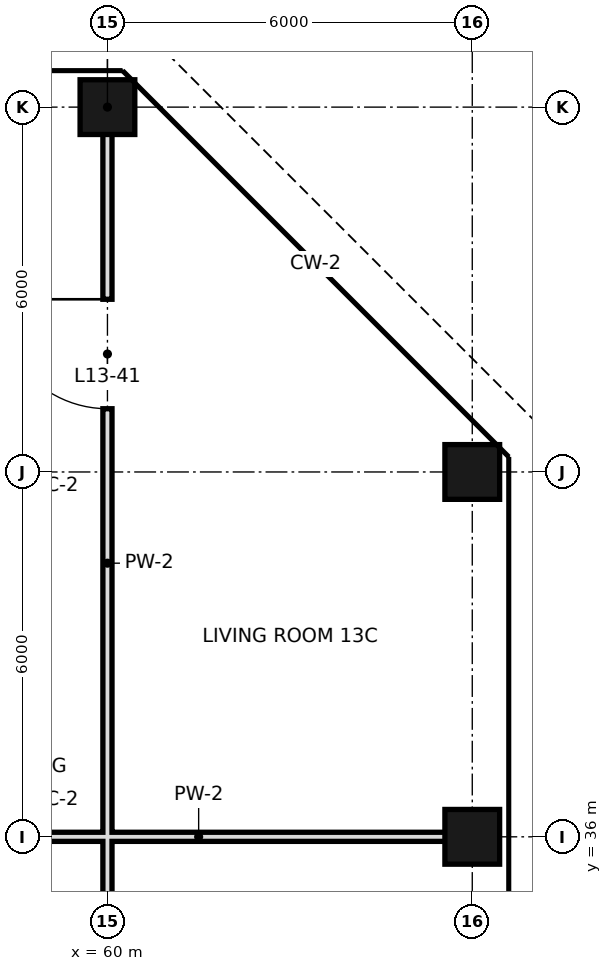
"""IFC4 building model, lengths in metres.
Left out: names, types, materials, properties, quantities, classifications, styles, units other than length and angle.
Written with IfcOpenShell. Run it as: python <this file> out.ifc"""

import sys

from ifc_helpers import new_model, si_unit, direction, frame, frame_2d, origin, origin_2d, place, context, subcontext, project, spatial, rectangle, hollow_rectangle, extrude, element, fill, save


model = new_model("IFC4")
c1 = context("Model", 3, precision=1e-05, world=origin(), true_north=direction((0.0, 1.0)))
c2 = subcontext(c1, "Body", "Model", "MODEL_VIEW")
j1 = project(units=[si_unit("LENGTHUNIT", "METRE"), si_unit("PLANEANGLEUNIT", "RADIAN")], contexts=[c1])
p1 = place(None, origin())
s1 = spatial("IfcSite", under=j1, at=p1, CompositionType="ELEMENT")
p2 = place(p1, origin())
s2 = spatial("IfcBuilding", under=s1, at=p2, CompositionType="ELEMENT")
p3 = place(p2, frame((0.0, 0.0, 67.8)))
s3 = spatial("IfcBuildingStorey", under=s2, at=p3, CompositionType="ELEMENT", Elevation=67.8)
for number, where, z_axis, x_axis in (
    (1, (60.0, 48.0, 0.0), (0.0, 0.0, 1.0), (1.0, 0.0, 0.0)),
    (2, (66.0, 36.0, 0.0), (0.0, 0.0, 1.0), (1.0, 0.0, 0.0)),
    (3, (66.0, 42.0, 0.0), (0.0, 0.0, 1.0), (1.0, 0.0, 0.0)),
):
    element("IfcColumn", number, at=place(p3, frame(where, z_axis=z_axis, x_axis=x_axis)), inside=s3, PredefinedType="COLUMN", context=c2, shape_type="SweptSolid", body=[
        extrude(hollow_rectangle(XDim=0.9, YDim=0.9, WallThickness=0.045, at=origin_2d()), origin(), (0.0, 0.0, 1.0), 3.6),
    ])
p4 = place(p3, frame((60.0, 33.0, 0.0), z_axis=(0.0, 0.0, 1.0), x_axis=(0.0, 1.0, 0.0)))
e4 = element("IfcWall", 4, at=p4, inside=s3, PredefinedType="PARTITIONING", context=c2, shape_type="SweptSolid", body=[
    extrude(rectangle(XDim=15.0, YDim=0.15, at=frame_2d((7.5, 0.0))), origin(), (0.0, 0.0, 1.0), 3.42),
])
p5 = place(p4, frame((1.0, 0.0, 0.0)))
e5 = element("IfcOpeningElement", 5, at=p5, cuts=e4, PredefinedType="OPENING", context=c2, shape_type="SweptSolid", body=[
    extrude(rectangle(XDim=1.0, YDim=2.4, at=frame_2d((0.5, 1.2))), frame((0.0, 0.085, 0.0), z_axis=(0.0, -1.0, 0.0), x_axis=(1.0, 0.0, 0.0)), (0.0, 0.0, 1.0), 0.17),
])
p6 = place(p4, frame((10.04, 0.0, 0.0)))
e6 = element("IfcOpeningElement", 6, at=p6, cuts=e4, PredefinedType="OPENING", context=c2, shape_type="SweptSolid", body=[
    extrude(rectangle(XDim=1.8, YDim=2.4, at=frame_2d((0.9, 1.2))), frame((0.0, 0.085, 0.0), z_axis=(0.0, -1.0, 0.0), x_axis=(1.0, 0.0, 0.0)), (0.0, 0.0, 1.0), 0.17),
])
p7 = place(p3, frame((57.0, 36.0, 0.0), z_axis=(0.0, 0.0, 1.0), x_axis=(1.0, 0.0, 0.0)))
e7 = element("IfcWall", 7, at=p7, inside=s3, PredefinedType="PARTITIONING", context=c2, shape_type="SweptSolid", body=[
    extrude(rectangle(XDim=9.0, YDim=0.15, at=frame_2d((4.5, 0.0))), origin(), (0.0, 0.0, 1.0), 2.52),
])
p8 = place(p6, frame((1.8, 0.0, 0.0), z_axis=(0.0, 0.0, 1.0), x_axis=(-1.0, 0.0, 0.0)))
e8 = element("IfcDoor", 8, at=p8, inside=s3, OperationType="SINGLE_SWING_LEFT", PredefinedType="DOOR", context=c2, shape_type="SweptSolid", body=[
    extrude(rectangle(XDim=1.8, YDim=2.4, at=frame_2d((0.9, 1.2))), frame((0.0, 0.025, 0.0), z_axis=(0.0, -1.0, 0.0), x_axis=(1.0, 0.0, 0.0)), (0.0, 0.0, 1.0), 0.05),
])
fill(e6, e8)
save(model, sys.argv[1])
